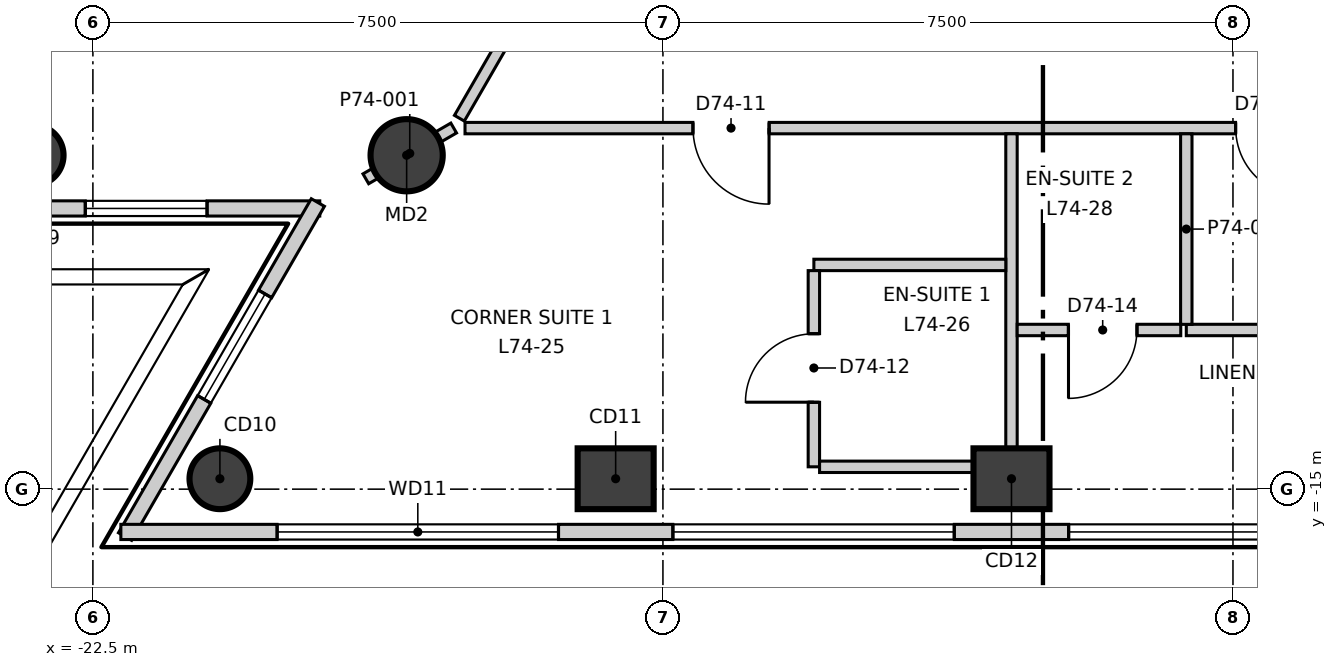
"""IFC4 building model, lengths in metres.
Left out: names, types, materials, properties, quantities, classifications, styles, units other than length and angle.
Written with IfcOpenShell. Run it as: python <this file> out.ifc"""

import sys

from ifc_helpers import new_model, si_unit, direction, frame, frame_2d, origin, origin_2d, place, context, subcontext, project, spatial, rectangle, circle, extrude, element, fill, save


model = new_model("IFC4")
c1 = context("Model", 3, precision=1e-05, world=origin(), true_north=direction((0.0, 1.0)))
c2 = subcontext(c1, "Body", "Model", "MODEL_VIEW")
j1 = project(units=[si_unit("LENGTHUNIT", "METRE"), si_unit("PLANEANGLEUNIT", "RADIAN")], contexts=[c1])
p1 = place(None, origin())
s1 = spatial("IfcSite", under=j1, at=p1, CompositionType="ELEMENT")
p2 = place(p1, origin())
s2 = spatial("IfcBuilding", under=s1, at=p2, CompositionType="ELEMENT")
p3 = place(p2, frame((0.0, 0.0, 311.5)))
s3 = spatial("IfcBuildingStorey", under=s2, at=p3, CompositionType="ELEMENT", Elevation=311.5)
for number, where, z_axis, x_axis in (
    (1, (-23.286, -10.607, -0.3), (0.0, 0.0, 1.0), (0.5, 0.866, 0.0)),
    (2, (-20.829, -14.863, -0.3), (0.0, 0.0, 1.0), (1.0, 0.0, 0.0)),
):
    element("IfcColumn", number, at=place(p3, frame(where, z_axis=z_axis, x_axis=x_axis)), inside=s3, PredefinedType="COLUMN", context=c2, shape_type="SweptSolid", body=[
        extrude(circle(Radius=0.4, at=origin_2d()), origin(), (0.0, 0.0, 1.0), 3.6),
    ])
for number, where, z_axis, x_axis in (
    (3, (-15.622, -14.863, -0.3), (0.0, 0.0, 1.0), (1.0, 0.0, 0.0)),
    (4, (-10.414, -14.863, -0.3), (0.0, 0.0, 1.0), (1.0, 0.0, 0.0)),
):
    element("IfcColumn", number, at=place(p3, frame(where, z_axis=z_axis, x_axis=x_axis)), inside=s3, PredefinedType="COLUMN", context=c2, shape_type="SweptSolid", body=[
        extrude(rectangle(XDim=1.0, YDim=0.8, at=origin_2d()), origin(), (0.0, 0.0, 1.0), 3.6),
    ])
p4 = place(p3, frame((-18.372, -10.607, -0.3), z_axis=(0.0, 0.0, 1.0), x_axis=(1.0, 0.0, 0.0)))
e5 = element("IfcColumn", 5, at=p4, inside=s3, PredefinedType="COLUMN", context=c2, shape_type="SweptSolid", body=[
    extrude(circle(Radius=0.475, at=origin_2d()), origin(), (0.0, 0.0, 1.0), 3.6),
])
p5 = place(p3, frame((-2.412, 26.948, 0.0), z_axis=(0.0, 0.0, 1.0), x_axis=(-0.500002044679, -0.866024223285, 0.0)))
e6 = element("IfcWall", 6, at=p5, inside=s3, PredefinedType="ELEMENTEDWALL", context=c2, shape_type="SweptSolid", body=[
    extrude(rectangle(XDim=44.243, YDim=0.2, at=frame_2d((22.122, 0.0))), origin(), (0.0, 0.0, 1.0), 3.3),
])
p6 = place(p5, frame((2.056, 0.0, 0.9)))
e7 = element("IfcOpeningElement", 7, at=p6, cuts=e6, PredefinedType="OPENING", context=c2, shape_type="SweptSolid", body=[
    extrude(rectangle(XDim=3.7, YDim=2.2, at=frame_2d((1.85, 1.1))), frame((0.0, 0.11, 0.0), z_axis=(0.0, -1.0, 0.0), x_axis=(1.0, 0.0, 0.0)), (0.0, 0.0, 1.0), 0.22),
])
p7 = place(p5, frame((7.263, 0.0, 0.9)))
e8 = element("IfcOpeningElement", 8, at=p7, cuts=e6, PredefinedType="OPENING", context=c2, shape_type="SweptSolid", body=[
    extrude(rectangle(XDim=3.7, YDim=2.2, at=frame_2d((1.85, 1.1))), frame((0.0, 0.11, 0.0), z_axis=(0.0, -1.0, 0.0), x_axis=(1.0, 0.0, 0.0)), (0.0, 0.0, 1.0), 0.22),
])
p8 = place(p5, frame((12.471, 0.0, 0.9)))
e9 = element("IfcOpeningElement", 9, at=p8, cuts=e6, PredefinedType="OPENING", context=c2, shape_type="SweptSolid", body=[
    extrude(rectangle(XDim=3.7, YDim=2.2, at=frame_2d((1.85, 1.1))), frame((0.0, 0.11, 0.0), z_axis=(0.0, -1.0, 0.0), x_axis=(1.0, 0.0, 0.0)), (0.0, 0.0, 1.0), 0.22),
])
p9 = place(p5, frame((17.678, 0.0, 0.9)))
e10 = element("IfcOpeningElement", 10, at=p9, cuts=e6, PredefinedType="OPENING", context=c2, shape_type="SweptSolid", body=[
    extrude(rectangle(XDim=3.7, YDim=2.2, at=frame_2d((1.85, 1.1))), frame((0.0, 0.11, 0.0), z_axis=(0.0, -1.0, 0.0), x_axis=(1.0, 0.0, 0.0)), (0.0, 0.0, 1.0), 0.22),
])
p10 = place(p5, frame((22.885, 0.0, 0.9)))
e11 = element("IfcOpeningElement", 11, at=p10, cuts=e6, PredefinedType="OPENING", context=c2, shape_type="SweptSolid", body=[
    extrude(rectangle(XDim=3.7, YDim=2.2, at=frame_2d((1.85, 1.1))), frame((0.0, 0.11, 0.0), z_axis=(0.0, -1.0, 0.0), x_axis=(1.0, 0.0, 0.0)), (0.0, 0.0, 1.0), 0.22),
])
p11 = place(p5, frame((28.092, 0.0, 0.9)))
e12 = element("IfcOpeningElement", 12, at=p11, cuts=e6, PredefinedType="OPENING", context=c2, shape_type="SweptSolid", body=[
    extrude(rectangle(XDim=3.7, YDim=2.2, at=frame_2d((1.85, 1.1))), frame((0.0, 0.11, 0.0), z_axis=(0.0, -1.0, 0.0), x_axis=(1.0, 0.0, 0.0)), (0.0, 0.0, 1.0), 0.22),
])
p12 = place(p5, frame((33.3, 0.0, 0.9)))
e13 = element("IfcOpeningElement", 13, at=p12, cuts=e6, PredefinedType="OPENING", context=c2, shape_type="SweptSolid", body=[
    extrude(rectangle(XDim=3.7, YDim=2.2, at=frame_2d((1.85, 1.1))), frame((0.0, 0.11, 0.0), z_axis=(0.0, -1.0, 0.0), x_axis=(1.0, 0.0, 0.0)), (0.0, 0.0, 1.0), 0.22),
])
p13 = place(p5, frame((38.507, 0.0, 0.9)))
e14 = element("IfcOpeningElement", 14, at=p13, cuts=e6, PredefinedType="OPENING", context=c2, shape_type="SweptSolid", body=[
    extrude(rectangle(XDim=3.7, YDim=2.2, at=frame_2d((1.85, 1.1))), frame((0.0, 0.11, 0.0), z_axis=(0.0, -1.0, 0.0), x_axis=(1.0, 0.0, 0.0)), (0.0, 0.0, 1.0), 0.22),
])
p14 = place(p3, frame((-24.589, -11.307, 0.0), z_axis=(0.0, 0.0, 1.0), x_axis=(1.0, 0.0, 0.0)))
e15 = element("IfcWall", 15, at=p14, inside=s3, PredefinedType="ELEMENTEDWALL", context=c2, shape_type="SweptSolid", body=[
    extrude(rectangle(XDim=5.074, YDim=0.2, at=frame_2d((2.537, 0.0))), origin(), (0.0, 0.0, 1.0), 3.3),
])
p15 = place(p14, frame((1.99, 0.0, 0.9)))
e16 = element("IfcOpeningElement", 16, at=p15, cuts=e15, PredefinedType="OPENING", context=c2, shape_type="SweptSolid", body=[
    extrude(rectangle(XDim=1.6, YDim=2.2, at=frame_2d((0.8, 1.1))), frame((0.0, 0.11, 0.0), z_axis=(0.0, -1.0, 0.0), x_axis=(1.0, 0.0, 0.0)), (0.0, 0.0, 1.0), 0.22),
])
p16 = place(p3, frame((-19.54, -11.229, 0.0), z_axis=(0.0, 0.0, 1.0), x_axis=(-0.499911250765, -0.866076637116, 0.0)))
e17 = element("IfcWall", 17, at=p16, inside=s3, PredefinedType="ELEMENTEDWALL", context=c2, shape_type="SweptSolid", body=[
    extrude(rectangle(XDim=5.075, YDim=0.2, at=frame_2d((2.537, 0.0))), origin(), (0.0, 0.0, 1.0), 3.3),
])
p17 = place(p16, frame((1.39, 0.0, 0.9)))
e18 = element("IfcOpeningElement", 18, at=p17, cuts=e17, PredefinedType="OPENING", context=c2, shape_type="SweptSolid", body=[
    extrude(rectangle(XDim=1.6, YDim=2.2, at=frame_2d((0.8, 1.1))), frame((0.0, 0.11, 0.0), z_axis=(0.0, -1.0, 0.0), x_axis=(1.0, 0.0, 0.0)), (0.0, 0.0, 1.0), 0.22),
])
p18 = place(p3, frame((-22.132, -15.563, 0.0), z_axis=(0.0, 0.0, 1.0), x_axis=(1.0, 0.0, 0.0)))
e19 = element("IfcWall", 19, at=p18, inside=s3, PredefinedType="ELEMENTEDWALL", context=c2, shape_type="SweptSolid", body=[
    extrude(rectangle(XDim=44.244, YDim=0.2, at=frame_2d((22.122, 0.0))), origin(), (0.0, 0.0, 1.0), 3.3),
])
p19 = place(p18, frame((2.057, 0.0, 0.9)))
e20 = element("IfcOpeningElement", 20, at=p19, cuts=e19, PredefinedType="OPENING", context=c2, shape_type="SweptSolid", body=[
    extrude(rectangle(XDim=3.7, YDim=2.2, at=frame_2d((1.85, 1.1))), frame((0.0, 0.11, 0.0), z_axis=(0.0, -1.0, 0.0), x_axis=(1.0, 0.0, 0.0)), (0.0, 0.0, 1.0), 0.22),
])
p20 = place(p18, frame((7.264, 0.0, 0.9)))
e21 = element("IfcOpeningElement", 21, at=p20, cuts=e19, PredefinedType="OPENING", context=c2, shape_type="SweptSolid", body=[
    extrude(rectangle(XDim=3.7, YDim=2.2, at=frame_2d((1.85, 1.1))), frame((0.0, 0.11, 0.0), z_axis=(0.0, -1.0, 0.0), x_axis=(1.0, 0.0, 0.0)), (0.0, 0.0, 1.0), 0.22),
])
p21 = place(p18, frame((12.471, 0.0, 0.9)))
e22 = element("IfcOpeningElement", 22, at=p21, cuts=e19, PredefinedType="OPENING", context=c2, shape_type="SweptSolid", body=[
    extrude(rectangle(XDim=3.7, YDim=2.2, at=frame_2d((1.85, 1.1))), frame((0.0, 0.11, 0.0), z_axis=(0.0, -1.0, 0.0), x_axis=(1.0, 0.0, 0.0)), (0.0, 0.0, 1.0), 0.22),
])
p22 = place(p18, frame((17.678, 0.0, 0.9)))
e23 = element("IfcOpeningElement", 23, at=p22, cuts=e19, PredefinedType="OPENING", context=c2, shape_type="SweptSolid", body=[
    extrude(rectangle(XDim=3.7, YDim=2.2, at=frame_2d((1.85, 1.1))), frame((0.0, 0.11, 0.0), z_axis=(0.0, -1.0, 0.0), x_axis=(1.0, 0.0, 0.0)), (0.0, 0.0, 1.0), 0.22),
])
p23 = place(p18, frame((22.886, 0.0, 0.9)))
e24 = element("IfcOpeningElement", 24, at=p23, cuts=e19, PredefinedType="OPENING", context=c2, shape_type="SweptSolid", body=[
    extrude(rectangle(XDim=3.7, YDim=2.2, at=frame_2d((1.85, 1.1))), frame((0.0, 0.11, 0.0), z_axis=(0.0, -1.0, 0.0), x_axis=(1.0, 0.0, 0.0)), (0.0, 0.0, 1.0), 0.22),
])
p24 = place(p18, frame((28.093, 0.0, 0.9)))
e25 = element("IfcOpeningElement", 25, at=p24, cuts=e19, PredefinedType="OPENING", context=c2, shape_type="SweptSolid", body=[
    extrude(rectangle(XDim=3.7, YDim=2.2, at=frame_2d((1.85, 1.1))), frame((0.0, 0.11, 0.0), z_axis=(0.0, -1.0, 0.0), x_axis=(1.0, 0.0, 0.0)), (0.0, 0.0, 1.0), 0.22),
])
p25 = place(p18, frame((33.3, 0.0, 0.9)))
e26 = element("IfcOpeningElement", 26, at=p25, cuts=e19, PredefinedType="OPENING", context=c2, shape_type="SweptSolid", body=[
    extrude(rectangle(XDim=3.7, YDim=2.2, at=frame_2d((1.85, 1.1))), frame((0.0, 0.11, 0.0), z_axis=(0.0, -1.0, 0.0), x_axis=(1.0, 0.0, 0.0)), (0.0, 0.0, 1.0), 0.22),
])
p26 = place(p18, frame((38.507, 0.0, 0.9)))
e27 = element("IfcOpeningElement", 27, at=p26, cuts=e19, PredefinedType="OPENING", context=c2, shape_type="SweptSolid", body=[
    extrude(rectangle(XDim=3.7, YDim=2.2, at=frame_2d((1.85, 1.1))), frame((0.0, 0.11, 0.0), z_axis=(0.0, -1.0, 0.0), x_axis=(1.0, 0.0, 0.0)), (0.0, 0.0, 1.0), 0.22),
])
p27 = place(p3, frame((-18.909, -10.917, 0.0), z_axis=(0.0, 0.0, 1.0), x_axis=(0.865847470378, 0.500308063137, 0.0)))
e28 = element("IfcWall", 28, at=p27, inside=s3, PredefinedType="PARTITIONING", context=c2, shape_type="SweptSolid", body=[
    extrude(rectangle(XDim=1.335, YDim=0.15, at=frame_2d((0.667, 0.0))), origin(), (0.0, 0.0, 1.0), 2.8),
])
p28 = place(p3, frame((-17.678, -10.12, 0.0), z_axis=(0.0, 0.0, 1.0), x_axis=(0.49998824015, 0.86603219323, 0.0)))
e29 = element("IfcWall", 29, at=p28, inside=s3, PredefinedType="PARTITIONING", context=c2, shape_type="SweptSolid", body=[
    extrude(rectangle(XDim=35.357, YDim=0.15, at=frame_2d((17.678, 0.0))), origin(), (0.0, 0.0, 1.0), 3.3),
])
p29 = place(p28, frame((28.607, 0.0, 0.0)))
e30 = element("IfcOpeningElement", 30, at=p29, cuts=e29, PredefinedType="OPENING", context=c2, shape_type="SweptSolid", body=[
    extrude(rectangle(XDim=1.0, YDim=2.1, at=frame_2d((0.5, 1.05))), frame((0.0, 0.085, 0.0), z_axis=(0.0, -1.0, 0.0), x_axis=(1.0, 0.0, 0.0)), (0.0, 0.0, 1.0), 0.17),
])
p30 = place(p28, frame((13.86, 0.0, 0.0)))
e31 = element("IfcOpeningElement", 31, at=p30, cuts=e29, PredefinedType="OPENING", context=c2, shape_type="SweptSolid", body=[
    extrude(rectangle(XDim=1.0, YDim=2.1, at=frame_2d((0.5, 1.05))), frame((0.0, 0.085, 0.0), z_axis=(0.0, -1.0, 0.0), x_axis=(1.0, 0.0, 0.0)), (0.0, 0.0, 1.0), 0.17),
])
p31 = place(p28, frame((18.96, 0.0, 0.0)))
e32 = element("IfcOpeningElement", 32, at=p31, cuts=e29, PredefinedType="OPENING", context=c2, shape_type="SweptSolid", body=[
    extrude(rectangle(XDim=0.9, YDim=2.1, at=frame_2d((0.45, 1.05))), frame((0.0, 0.085, 0.0), z_axis=(0.0, -1.0, 0.0), x_axis=(1.0, 0.0, 0.0)), (0.0, 0.0, 1.0), 0.17),
])
p32 = place(p28, frame((16.86, 0.0, 0.0)))
e33 = element("IfcOpeningElement", 33, at=p32, cuts=e29, PredefinedType="OPENING", context=c2, shape_type="SweptSolid", body=[
    extrude(rectangle(XDim=0.9, YDim=2.1, at=frame_2d((0.45, 1.05))), frame((0.0, 0.085, 0.0), z_axis=(0.0, -1.0, 0.0), x_axis=(1.0, 0.0, 0.0)), (0.0, 0.0, 1.0), 0.17),
])
p33 = place(p28, frame((8.146, 0.0, 0.0)))
e34 = element("IfcOpeningElement", 34, at=p33, cuts=e29, PredefinedType="OPENING", context=c2, shape_type="SweptSolid", body=[
    extrude(rectangle(XDim=1.0, YDim=2.1, at=frame_2d((0.5, 1.05))), frame((0.0, 0.085, 0.0), z_axis=(0.0, -1.0, 0.0), x_axis=(1.0, 0.0, 0.0)), (0.0, 0.0, 1.0), 0.17),
])
p34 = place(p28, frame((3.038, 0.0, 0.0)))
e35 = element("IfcOpeningElement", 35, at=p34, cuts=e29, PredefinedType="OPENING", context=c2, shape_type="SweptSolid", body=[
    extrude(rectangle(XDim=1.0, YDim=2.1, at=frame_2d((0.5, 1.05))), frame((0.0, 0.085, 0.0), z_axis=(0.0, -1.0, 0.0), x_axis=(1.0, 0.0, 0.0)), (0.0, 0.0, 1.0), 0.17),
])
p35 = place(p3, frame((-17.604, -10.25, 0.0), z_axis=(0.0, 0.0, 1.0), x_axis=(1.0, 0.0, 0.0)))
e36 = element("IfcWall", 36, at=p35, inside=s3, PredefinedType="PARTITIONING", context=c2, shape_type="SweptSolid", body=[
    extrude(rectangle(XDim=35.358, YDim=0.15, at=frame_2d((17.679, 0.0))), origin(), (0.0, 0.0, 1.0), 3.3),
])
p36 = place(p35, frame((3.0, 0.0, 0.0)))
e37 = element("IfcOpeningElement", 37, at=p36, cuts=e36, PredefinedType="OPENING", context=c2, shape_type="SweptSolid", body=[
    extrude(rectangle(XDim=1.0, YDim=2.1, at=frame_2d((0.5, 1.05))), frame((0.0, 0.085, 0.0), z_axis=(0.0, -1.0, 0.0), x_axis=(1.0, 0.0, 0.0)), (0.0, 0.0, 1.0), 0.17),
])
p37 = place(p35, frame((15.14, 0.0, 0.0)))
e38 = element("IfcOpeningElement", 38, at=p37, cuts=e36, PredefinedType="OPENING", context=c2, shape_type="SweptSolid", body=[
    extrude(rectangle(XDim=1.0, YDim=2.1, at=frame_2d((0.5, 1.05))), frame((0.0, 0.085, 0.0), z_axis=(0.0, -1.0, 0.0), x_axis=(1.0, 0.0, 0.0)), (0.0, 0.0, 1.0), 0.17),
])
p38 = place(p35, frame((10.14, 0.0, 0.0)))
e39 = element("IfcOpeningElement", 39, at=p38, cuts=e36, PredefinedType="OPENING", context=c2, shape_type="SweptSolid", body=[
    extrude(rectangle(XDim=0.9, YDim=2.1, at=frame_2d((0.45, 1.05))), frame((0.0, 0.085, 0.0), z_axis=(0.0, -1.0, 0.0), x_axis=(1.0, 0.0, 0.0)), (0.0, 0.0, 1.0), 0.17),
])
p39 = place(p35, frame((12.24, 0.0, 0.0)))
e40 = element("IfcOpeningElement", 40, at=p39, cuts=e36, PredefinedType="OPENING", context=c2, shape_type="SweptSolid", body=[
    extrude(rectangle(XDim=0.9, YDim=2.1, at=frame_2d((0.45, 1.05))), frame((0.0, 0.085, 0.0), z_axis=(0.0, -1.0, 0.0), x_axis=(1.0, 0.0, 0.0)), (0.0, 0.0, 1.0), 0.17),
])
p40 = place(p35, frame((25.654, 0.0, 0.0)))
e41 = element("IfcOpeningElement", 41, at=p40, cuts=e36, PredefinedType="OPENING", context=c2, shape_type="SweptSolid", body=[
    extrude(rectangle(XDim=1.0, YDim=2.1, at=frame_2d((0.5, 1.05))), frame((0.0, 0.085, 0.0), z_axis=(0.0, -1.0, 0.0), x_axis=(1.0, 0.0, 0.0)), (0.0, 0.0, 1.0), 0.17),
])
p41 = place(p35, frame((20.554, 0.0, 0.0)))
e42 = element("IfcOpeningElement", 42, at=p41, cuts=e36, PredefinedType="OPENING", context=c2, shape_type="SweptSolid", body=[
    extrude(rectangle(XDim=0.9, YDim=2.1, at=frame_2d((0.45, 1.05))), frame((0.0, 0.085, 0.0), z_axis=(0.0, -1.0, 0.0), x_axis=(1.0, 0.0, 0.0)), (0.0, 0.0, 1.0), 0.17),
])
p42 = place(p35, frame((22.754, 0.0, 0.0)))
e43 = element("IfcOpeningElement", 43, at=p42, cuts=e36, PredefinedType="OPENING", context=c2, shape_type="SweptSolid", body=[
    extrude(rectangle(XDim=0.9, YDim=2.1, at=frame_2d((0.45, 1.05))), frame((0.0, 0.085, 0.0), z_axis=(0.0, -1.0, 0.0), x_axis=(1.0, 0.0, 0.0)), (0.0, 0.0, 1.0), 0.17),
])
p43 = place(p35, frame((31.168, 0.0, 0.0)))
e44 = element("IfcOpeningElement", 44, at=p43, cuts=e36, PredefinedType="OPENING", context=c2, shape_type="SweptSolid", body=[
    extrude(rectangle(XDim=1.0, YDim=2.1, at=frame_2d((0.5, 1.05))), frame((0.0, 0.085, 0.0), z_axis=(0.0, -1.0, 0.0), x_axis=(1.0, 0.0, 0.0)), (0.0, 0.0, 1.0), 0.17),
])
p44 = place(p3, frame((-10.414, -14.858, 0.0), z_axis=(0.0, 0.0, 1.0), x_axis=(0.0, 1.0, 0.0)))
e45 = element("IfcWall", 45, at=p44, inside=s3, PredefinedType="PARTITIONING", context=c2, shape_type="SweptSolid", body=[
    extrude(rectangle(XDim=4.533, YDim=0.15, at=frame_2d((2.267, 0.0))), origin(), (0.0, 0.0, 1.0), 3.1),
])
p45 = place(p3, frame((-8.114, -12.906, 0.0), z_axis=(0.0, 0.0, 1.0), x_axis=(1.0, 0.0, 0.0)))
e46 = element("IfcWall", 46, at=p45, inside=s3, PredefinedType="PARTITIONING", context=c2, shape_type="SweptSolid", body=[
    extrude(rectangle(XDim=2.2, YDim=0.15, at=frame_2d((1.1, 0.0))), origin(), (0.0, 0.0, 1.0), 3.3),
])
p46 = place(p3, frame((-8.114, -12.832, 0.0), z_axis=(0.0, 0.0, 1.0), x_axis=(0.0, 1.0, 0.0)))
e47 = element("IfcWall", 47, at=p46, inside=s3, PredefinedType="PARTITIONING", context=c2, shape_type="SweptSolid", body=[
    extrude(rectangle(XDim=2.507, YDim=0.15, at=frame_2d((1.253, 0.0))), origin(), (0.0, 0.0, 1.0), 3.3),
])
p47 = place(p3, frame((-13.014, -12.05, 0.0), z_axis=(0.0, 0.0, 1.0), x_axis=(1.0, 0.0, 0.0)))
e48 = element("IfcWall", 48, at=p47, inside=s3, PredefinedType="PARTITIONING", context=c2, shape_type="SweptSolid", body=[
    extrude(rectangle(XDim=2.525, YDim=0.15, at=frame_2d((1.262, 0.0))), origin(), (0.0, 0.0, 1.0), 3.3),
])
p48 = place(p3, frame((-13.014, -14.706, 0.0), z_axis=(0.0, 0.0, 1.0), x_axis=(0.0, 1.0, 0.0)))
e49 = element("IfcWall", 49, at=p48, inside=s3, PredefinedType="PARTITIONING", context=c2, shape_type="SweptSolid", body=[
    extrude(rectangle(XDim=2.581, YDim=0.15, at=frame_2d((1.291, 0.0))), origin(), (0.0, 0.0, 1.0), 3.3),
])
p49 = place(p48, frame((0.85, 0.0, 0.0)))
e50 = element("IfcOpeningElement", 50, at=p49, cuts=e49, PredefinedType="OPENING", context=c2, shape_type="SweptSolid", body=[
    extrude(rectangle(XDim=0.9, YDim=2.1, at=frame_2d((0.45, 1.05))), frame((0.0, 0.085, 0.0), z_axis=(0.0, -1.0, 0.0), x_axis=(1.0, 0.0, 0.0)), (0.0, 0.0, 1.0), 0.17),
])
p50 = place(p3, frame((-12.939, -14.706, 0.0), z_axis=(0.0, 0.0, 1.0), x_axis=(1.0, 0.0, 0.0)))
e51 = element("IfcWall", 51, at=p50, inside=s3, PredefinedType="PARTITIONING", context=c2, shape_type="SweptSolid", body=[
    extrude(rectangle(XDim=2.45, YDim=0.15, at=frame_2d((1.225, 0.0))), origin(), (0.0, 0.0, 1.0), 2.6),
])
p51 = place(p3, frame((-10.339, -12.906, 0.0), z_axis=(0.0, 0.0, 1.0), x_axis=(1.0, 0.0, 0.0)))
e52 = element("IfcWall", 52, at=p51, inside=s3, PredefinedType="PARTITIONING", context=c2, shape_type="SweptSolid", body=[
    extrude(rectangle(XDim=2.152, YDim=0.15, at=frame_2d((1.076, 0.0))), origin(), (0.0, 0.0, 1.0), 3.3),
])
p52 = place(p51, frame((0.675, 0.0, 0.0)))
e53 = element("IfcOpeningElement", 53, at=p52, cuts=e52, PredefinedType="OPENING", context=c2, shape_type="SweptSolid", body=[
    extrude(rectangle(XDim=0.9, YDim=2.1, at=frame_2d((0.45, 1.05))), frame((0.0, 0.085, 0.0), z_axis=(0.0, -1.0, 0.0), x_axis=(1.0, 0.0, 0.0)), (0.0, 0.0, 1.0), 0.17),
])
p53 = place(p13, origin())
e54 = element("IfcWindow", 54, at=p53, inside=s3, PartitioningType="SINGLE_PANEL", PredefinedType="WINDOW", context=c2, shape_type="SweptSolid", body=[
    extrude(rectangle(XDim=3.7, YDim=2.2, at=frame_2d((1.85, 1.1))), frame((0.0, 0.03, 0.0), z_axis=(0.0, -1.0, 0.0), x_axis=(1.0, 0.0, 0.0)), (0.0, 0.0, 1.0), 0.06),
])
fill(e14, e54)
p54 = place(p15, origin())
e55 = element("IfcWindow", 55, at=p54, inside=s3, PartitioningType="SINGLE_PANEL", PredefinedType="WINDOW", context=c2, shape_type="SweptSolid", body=[
    extrude(rectangle(XDim=1.6, YDim=2.2, at=frame_2d((0.8, 1.1))), frame((0.0, 0.03, 0.0), z_axis=(0.0, -1.0, 0.0), x_axis=(1.0, 0.0, 0.0)), (0.0, 0.0, 1.0), 0.06),
])
fill(e16, e55)
p55 = place(p17, origin())
e56 = element("IfcWindow", 56, at=p55, inside=s3, PartitioningType="SINGLE_PANEL", PredefinedType="WINDOW", context=c2, shape_type="SweptSolid", body=[
    extrude(rectangle(XDim=1.6, YDim=2.2, at=frame_2d((0.8, 1.1))), frame((0.0, 0.03, 0.0), z_axis=(0.0, -1.0, 0.0), x_axis=(1.0, 0.0, 0.0)), (0.0, 0.0, 1.0), 0.06),
])
fill(e18, e56)
p56 = place(p19, origin())
e57 = element("IfcWindow", 57, at=p56, inside=s3, PartitioningType="SINGLE_PANEL", PredefinedType="WINDOW", context=c2, shape_type="SweptSolid", body=[
    extrude(rectangle(XDim=3.7, YDim=2.2, at=frame_2d((1.85, 1.1))), frame((0.0, 0.03, 0.0), z_axis=(0.0, -1.0, 0.0), x_axis=(1.0, 0.0, 0.0)), (0.0, 0.0, 1.0), 0.06),
])
fill(e20, e57)
p57 = place(p20, origin())
e58 = element("IfcWindow", 58, at=p57, inside=s3, PartitioningType="SINGLE_PANEL", PredefinedType="WINDOW", context=c2, shape_type="SweptSolid", body=[
    extrude(rectangle(XDim=3.7, YDim=2.2, at=frame_2d((1.85, 1.1))), frame((0.0, 0.03, 0.0), z_axis=(0.0, -1.0, 0.0), x_axis=(1.0, 0.0, 0.0)), (0.0, 0.0, 1.0), 0.06),
])
fill(e21, e58)
p58 = place(p21, origin())
e59 = element("IfcWindow", 59, at=p58, inside=s3, PartitioningType="SINGLE_PANEL", PredefinedType="WINDOW", context=c2, shape_type="SweptSolid", body=[
    extrude(rectangle(XDim=3.7, YDim=2.2, at=frame_2d((1.85, 1.1))), frame((0.0, 0.03, 0.0), z_axis=(0.0, -1.0, 0.0), x_axis=(1.0, 0.0, 0.0)), (0.0, 0.0, 1.0), 0.06),
])
fill(e22, e59)
p59 = place(p36, origin())
e60 = element("IfcDoor", 60, at=p59, inside=s3, OperationType="SINGLE_SWING_RIGHT", PredefinedType="DOOR", context=c2, shape_type="SweptSolid", body=[
    extrude(rectangle(XDim=1.0, YDim=2.1, at=frame_2d((0.5, 1.05))), frame((0.0, 0.025, 0.0), z_axis=(0.0, -1.0, 0.0), x_axis=(1.0, 0.0, 0.0)), (0.0, 0.0, 1.0), 0.05),
])
fill(e37, e60)
p60 = place(p49, origin())
e61 = element("IfcDoor", 61, at=p60, inside=s3, OperationType="SINGLE_SWING_RIGHT", PredefinedType="DOOR", context=c2, shape_type="SweptSolid", body=[
    extrude(rectangle(XDim=0.9, YDim=2.1, at=frame_2d((0.45, 1.05))), frame((0.0, 0.025, 0.0), z_axis=(0.0, -1.0, 0.0), x_axis=(1.0, 0.0, 0.0)), (0.0, 0.0, 1.0), 0.05),
])
fill(e50, e61)
p61 = place(p52, origin())
e62 = element("IfcDoor", 62, at=p61, inside=s3, OperationType="SINGLE_SWING_LEFT", PredefinedType="DOOR", context=c2, shape_type="SweptSolid", body=[
    extrude(rectangle(XDim=0.9, YDim=2.1, at=frame_2d((0.45, 1.05))), frame((0.0, 0.025, 0.0), z_axis=(0.0, -1.0, 0.0), x_axis=(1.0, 0.0, 0.0)), (0.0, 0.0, 1.0), 0.05),
])
fill(e53, e62)
p62 = place(p38, origin())
e63 = element("IfcDoor", 63, at=p62, inside=s3, OperationType="SINGLE_SWING_RIGHT", PredefinedType="DOOR", context=c2, shape_type="SweptSolid", body=[
    extrude(rectangle(XDim=0.9, YDim=2.1, at=frame_2d((0.45, 1.05))), frame((0.0, 0.025, 0.0), z_axis=(0.0, -1.0, 0.0), x_axis=(1.0, 0.0, 0.0)), (0.0, 0.0, 1.0), 0.05),
])
fill(e39, e63)
save(model, sys.argv[1])
